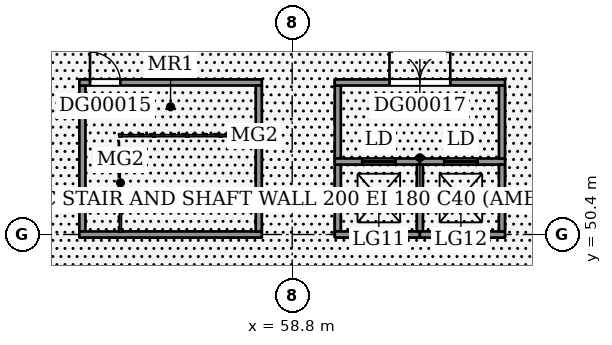
"""IFC4 building model, lengths in metres.
Left out: names, types, materials, properties, quantities, classifications, styles, units other than length and angle.
Written with IfcOpenShell. Run it as: python <this file> out.ifc"""

import sys

from ifc_helpers import new_model, si_unit, direction, frame, frame_2d, origin, place, context, subcontext, project, spatial, rectangle, extrude, element, fill, save


model = new_model("IFC4")
c1 = context("Model", 3, precision=1e-05, world=origin(), true_north=direction((0.0, 1.0)))
c2 = subcontext(c1, "Body", "Model", "MODEL_VIEW")
j1 = project(units=[si_unit("LENGTHUNIT", "METRE"), si_unit("PLANEANGLEUNIT", "RADIAN")], contexts=[c1])
p1 = place(None, origin())
s1 = spatial("IfcSite", under=j1, at=p1, CompositionType="ELEMENT")
p2 = place(p1, origin())
s2 = spatial("IfcBuilding", under=s1, at=p2, CompositionType="ELEMENT")
p3 = place(p2, origin())
s3 = spatial("IfcBuildingStorey", under=s2, at=p3, CompositionType="ELEMENT", Elevation=0.0)
p4 = place(p3, frame((51.9, 50.5, 0.0), z_axis=(0.0, 0.0, 1.0), x_axis=(0.0, 1.0, 0.0)))
e1 = element("IfcWall", 1, at=p4, inside=s3, PredefinedType="SOLIDWALL", context=c2, shape_type="SweptSolid", body=[
    extrude(rectangle(XDim=4.8, YDim=0.2, at=frame_2d((2.4, 0.0))), origin(), (0.0, 0.0, 1.0), 3.6),
])
p5 = place(p3, frame((51.8, 50.4, 0.0), z_axis=(0.0, 0.0, 1.0), x_axis=(1.0, 0.0, 0.0)))
e2 = element("IfcWall", 2, at=p5, inside=s3, PredefinedType="SOLIDWALL", context=c2, shape_type="SweptSolid", body=[
    extrude(rectangle(XDim=6.0, YDim=0.2, at=frame_2d((3.0, 0.0))), origin(), (0.0, 0.0, 1.0), 3.6),
])
p6 = place(p3, frame((51.8, 55.4, 0.0), z_axis=(0.0, 0.0, 1.0), x_axis=(1.0, 0.0, 0.0)))
e3 = element("IfcWall", 3, at=p6, inside=s3, PredefinedType="SOLIDWALL", context=c2, shape_type="SweptSolid", body=[
    extrude(rectangle(XDim=6.0, YDim=0.2, at=frame_2d((3.0, 0.0))), origin(), (0.0, 0.0, 1.0), 3.6),
])
p7 = place(p6, frame((0.35, 0.0, 0.0)))
e4 = element("IfcOpeningElement", 4, at=p7, cuts=e3, PredefinedType="OPENING", context=c2, shape_type="SweptSolid", body=[
    extrude(rectangle(XDim=1.0, YDim=2.1, at=frame_2d((0.5, 1.05))), frame((0.0, 0.11, 0.0), z_axis=(0.0, -1.0, 0.0), x_axis=(1.0, 0.0, 0.0)), (0.0, 0.0, 1.0), 0.22),
])
p8 = place(p3, frame((57.7, 50.5, 0.0), z_axis=(0.0, 0.0, 1.0), x_axis=(0.0, 1.0, 0.0)))
e5 = element("IfcWall", 5, at=p8, inside=s3, PredefinedType="SOLIDWALL", context=c2, shape_type="SweptSolid", body=[
    extrude(rectangle(XDim=4.8, YDim=0.2, at=frame_2d((2.4, 0.0))), origin(), (0.0, 0.0, 1.0), 3.6),
])
p9 = place(p3, frame((60.3, 50.5, 0.0), z_axis=(0.0, 0.0, 1.0), x_axis=(0.0, 1.0, 0.0)))
e6 = element("IfcWall", 6, at=p9, inside=s3, PredefinedType="SOLIDWALL", context=c2, shape_type="SweptSolid", body=[
    extrude(rectangle(XDim=2.2, YDim=0.2, at=frame_2d((1.1, 0.0))), origin(), (0.0, 0.0, 1.0), 3.6),
])
p10 = place(p3, frame((60.2, 50.4, 0.0), z_axis=(0.0, 0.0, 1.0), x_axis=(1.0, 0.0, 0.0)))
e7 = element("IfcWall", 7, at=p10, inside=s3, PredefinedType="SOLIDWALL", context=c2, shape_type="SweptSolid", body=[
    extrude(rectangle(XDim=2.8, YDim=0.2, at=frame_2d((1.4, 0.0))), origin(), (0.0, 0.0, 1.0), 3.6),
])
p11 = place(p3, frame((60.3, 52.9, 0.0), z_axis=(0.0, 0.0, 1.0), x_axis=(0.0, 1.0, 0.0)))
e8 = element("IfcWall", 8, at=p11, inside=s3, PredefinedType="SOLIDWALL", context=c2, shape_type="SweptSolid", body=[
    extrude(rectangle(XDim=2.4, YDim=0.2, at=frame_2d((1.2, 0.0))), origin(), (0.0, 0.0, 1.0), 3.6),
])
p12 = place(p3, frame((60.2, 52.8, 0.0), z_axis=(0.0, 0.0, 1.0), x_axis=(1.0, 0.0, 0.0)))
e9 = element("IfcWall", 9, at=p12, inside=s3, PredefinedType="SOLIDWALL", context=c2, shape_type="SweptSolid", body=[
    extrude(rectangle(XDim=2.8, YDim=0.2, at=frame_2d((1.4, 0.0))), origin(), (0.0, 0.0, 1.0), 3.6),
])
p13 = place(p12, frame((0.9, 0.0, 0.0)))
e10 = element("IfcOpeningElement", 10, at=p13, cuts=e9, PredefinedType="OPENING", context=c2, shape_type="SweptSolid", body=[
    extrude(rectangle(XDim=1.1, YDim=2.1, at=frame_2d((0.55, 1.05))), frame((0.0, 0.11, 0.0), z_axis=(0.0, -1.0, 0.0), x_axis=(1.0, 0.0, 0.0)), (0.0, 0.0, 1.0), 0.22),
])
p14 = place(p3, frame((60.2, 55.4, 0.0), z_axis=(0.0, 0.0, 1.0), x_axis=(1.0, 0.0, 0.0)))
e11 = element("IfcWall", 11, at=p14, inside=s3, PredefinedType="SOLIDWALL", context=c2, shape_type="SweptSolid", body=[
    extrude(rectangle(XDim=5.6, YDim=0.2, at=frame_2d((2.8, 0.0))), origin(), (0.0, 0.0, 1.0), 3.6),
])
p15 = place(p14, frame((1.8, 0.0, 0.0)))
e12 = element("IfcOpeningElement", 12, at=p15, cuts=e11, PredefinedType="OPENING", context=c2, shape_type="SweptSolid", body=[
    extrude(rectangle(XDim=2.0, YDim=2.1, at=frame_2d((1.0, 1.05))), frame((0.0, 0.11, 0.0), z_axis=(0.0, -1.0, 0.0), x_axis=(1.0, 0.0, 0.0)), (0.0, 0.0, 1.0), 0.22),
])
p16 = place(p3, frame((63.0, 50.5, 0.0), z_axis=(0.0, 0.0, 1.0), x_axis=(0.0, 1.0, 0.0)))
e13 = element("IfcWall", 13, at=p16, inside=s3, PredefinedType="SOLIDWALL", context=c2, shape_type="SweptSolid", body=[
    extrude(rectangle(XDim=2.2, YDim=0.2, at=frame_2d((1.1, 0.0))), origin(), (0.0, 0.0, 1.0), 3.6),
])
p17 = place(p3, frame((63.0, 50.4, 0.0), z_axis=(0.0, 0.0, 1.0), x_axis=(1.0, 0.0, 0.0)))
e14 = element("IfcWall", 14, at=p17, inside=s3, PredefinedType="SOLIDWALL", context=c2, shape_type="SweptSolid", body=[
    extrude(rectangle(XDim=2.8, YDim=0.2, at=frame_2d((1.4, 0.0))), origin(), (0.0, 0.0, 1.0), 3.6),
])
p18 = place(p3, frame((63.0, 52.8, 0.0), z_axis=(0.0, 0.0, 1.0), x_axis=(1.0, 0.0, 0.0)))
e15 = element("IfcWall", 15, at=p18, inside=s3, PredefinedType="SOLIDWALL", context=c2, shape_type="SweptSolid", body=[
    extrude(rectangle(XDim=2.8, YDim=0.2, at=frame_2d((1.4, 0.0))), origin(), (0.0, 0.0, 1.0), 3.6),
])
p19 = place(p18, frame((0.8, 0.0, 0.0)))
e16 = element("IfcOpeningElement", 16, at=p19, cuts=e15, PredefinedType="OPENING", context=c2, shape_type="SweptSolid", body=[
    extrude(rectangle(XDim=1.1, YDim=2.1, at=frame_2d((0.55, 1.05))), frame((0.0, 0.11, 0.0), z_axis=(0.0, -1.0, 0.0), x_axis=(1.0, 0.0, 0.0)), (0.0, 0.0, 1.0), 0.22),
])
p20 = place(p3, frame((65.7, 50.5, 0.0), z_axis=(0.0, 0.0, 1.0), x_axis=(0.0, 1.0, 0.0)))
e17 = element("IfcWall", 17, at=p20, inside=s3, PredefinedType="SOLIDWALL", context=c2, shape_type="SweptSolid", body=[
    extrude(rectangle(XDim=2.2, YDim=0.2, at=frame_2d((1.1, 0.0))), origin(), (0.0, 0.0, 1.0), 3.6),
])
p21 = place(p3, frame((65.7, 52.9, 0.0), z_axis=(0.0, 0.0, 1.0), x_axis=(0.0, 1.0, 0.0)))
e18 = element("IfcWall", 18, at=p21, inside=s3, PredefinedType="SOLIDWALL", context=c2, shape_type="SweptSolid", body=[
    extrude(rectangle(XDim=2.4, YDim=0.2, at=frame_2d((1.2, 0.0))), origin(), (0.0, 0.0, 1.0), 3.6),
])
p22 = place(p7, origin())
e19 = element("IfcDoor", 19, at=p22, inside=s3, OperationType="SINGLE_SWING_LEFT", PredefinedType="DOOR", context=c2, shape_type="SweptSolid", body=[
    extrude(rectangle(XDim=1.0, YDim=2.1, at=frame_2d((0.5, 1.05))), frame((0.0, 0.025, 0.0), z_axis=(0.0, -1.0, 0.0), x_axis=(1.0, 0.0, 0.0)), (0.0, 0.0, 1.0), 0.05),
])
fill(e4, e19)
p23 = place(p15, origin())
e20 = element("IfcDoor", 20, at=p23, inside=s3, OperationType="DOUBLE_DOOR_SINGLE_SWING", PredefinedType="DOOR", context=c2, shape_type="SweptSolid", body=[
    extrude(rectangle(XDim=2.0, YDim=2.1, at=frame_2d((1.0, 1.05))), frame((0.0, 0.025, 0.0), z_axis=(0.0, -1.0, 0.0), x_axis=(1.0, 0.0, 0.0)), (0.0, 0.0, 1.0), 0.05),
])
fill(e12, e20)
p24 = place(p13, origin())
e21 = element("IfcDoor", 21, at=p24, inside=s3, OperationType="SLIDING_TO_LEFT", PredefinedType="DOOR", context=c2, shape_type="SweptSolid", body=[
    extrude(rectangle(XDim=1.1, YDim=2.1, at=frame_2d((0.55, 1.05))), frame((0.0, 0.025, 0.0), z_axis=(0.0, -1.0, 0.0), x_axis=(1.0, 0.0, 0.0)), (0.0, 0.0, 1.0), 0.05),
])
fill(e10, e21)
p25 = place(p19, origin())
e22 = element("IfcDoor", 22, at=p25, inside=s3, OperationType="SLIDING_TO_LEFT", PredefinedType="DOOR", context=c2, shape_type="SweptSolid", body=[
    extrude(rectangle(XDim=1.1, YDim=2.1, at=frame_2d((0.55, 1.05))), frame((0.0, 0.025, 0.0), z_axis=(0.0, -1.0, 0.0), x_axis=(1.0, 0.0, 0.0)), (0.0, 0.0, 1.0), 0.05),
])
fill(e16, e22)
save(model, sys.argv[1])
